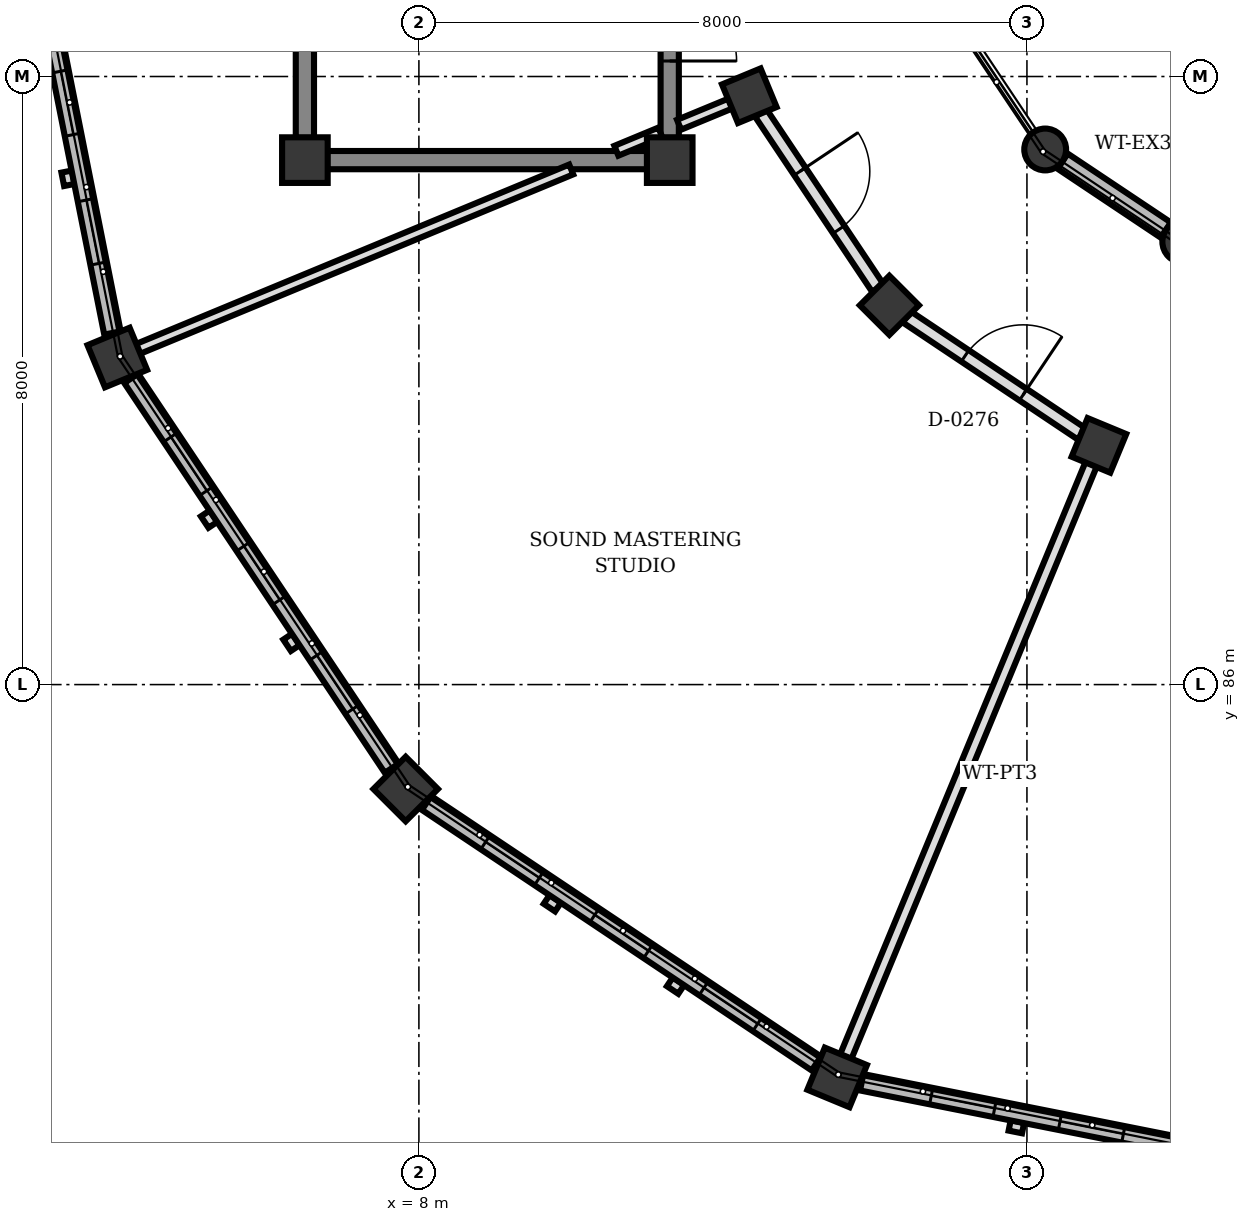
"""IFC4 building model, lengths in metres.
Left out: names, types, materials, properties, quantities, classifications, styles, units other than length and angle.
Written with IfcOpenShell. Run it as: python <this file> out.ifc"""

import sys

from ifc_helpers import new_model, si_unit, direction, frame, frame_2d, origin, origin_2d, place, context, subcontext, project, spatial, rectangle, circle, extrude, element, fill, save


model = new_model("IFC4")
c1 = context("Model", 3, precision=1e-05, world=origin(), true_north=direction((0.0, 1.0)))
c2 = subcontext(c1, "Body", "Model", "MODEL_VIEW")
j1 = project(units=[si_unit("LENGTHUNIT", "METRE"), si_unit("PLANEANGLEUNIT", "RADIAN")], contexts=[c1])
p1 = place(None, origin())
s1 = spatial("IfcSite", under=j1, at=p1, CompositionType="ELEMENT")
p2 = place(p1, origin())
s2 = spatial("IfcBuilding", under=s1, at=p2, CompositionType="ELEMENT")
p3 = place(p2, frame((0.0, 0.0, 12.5)))
s3 = spatial("IfcBuildingStorey", under=s2, at=p3, CompositionType="ELEMENT", Elevation=12.5)
for number, where, z_axis, x_axis in (
    (1, (6.5, 92.9, 0.0), (0.0, 0.0, 1.0), (1.0, 0.0, 0.0)),
    (2, (11.3, 92.9, 0.0), (0.0, 0.0, 1.0), (1.0, 0.0, 0.0)),
):
    element("IfcColumn", number, at=place(p3, frame(where, z_axis=z_axis, x_axis=x_axis)), inside=s3, PredefinedType="COLUMN", context=c2, shape_type="SweptSolid", body=[
        extrude(rectangle(XDim=0.6, YDim=0.6, at=origin_2d()), origin(), (0.0, 0.0, 1.0), 4.0),
    ])
for number, where, z_axis, x_axis in (
    (3, (16.24, 93.04, 0.0), (0.0, 0.0, 1.0), (1.0, 0.0, 0.0)),
    (4, (18.057, 91.826, 0.0), (0.0, 0.0, 1.0), (1.0, 0.0, 0.0)),
):
    element("IfcColumn", number, at=place(p3, frame(where, z_axis=z_axis, x_axis=x_axis)), inside=s3, PredefinedType="COLUMN", context=c2, shape_type="SweptSolid", body=[
        extrude(circle(Radius=0.275, at=origin_2d()), origin(), (0.0, 0.0, 1.0), 3.765),
    ])
for number, where, z_axis, x_axis in (
    (5, (12.347, 93.747, 0.0), (0.0, 0.0, 1.0), (-0.924, -0.383, 0.0)),
    (6, (14.19, 90.99, 0.0), (0.0, 0.0, 1.0), (-0.707, -0.707, 0.0)),
    (7, (16.947, 89.147, 0.0), (0.0, 0.0, 1.0), (-0.383, -0.924, 0.0)),
):
    element("IfcColumn", number, at=place(p3, frame(where, z_axis=z_axis, x_axis=x_axis)), inside=s3, PredefinedType="COLUMN", context=c2, shape_type="SweptSolid", body=[
        extrude(rectangle(XDim=0.55, YDim=0.55, at=origin_2d()), origin(), (0.0, 0.0, 1.0), 4.49),
    ])
for number, where, z_axis, x_axis in (
    (8, (4.032, 90.303, 0.0), (0.0, 0.0, 1.0), (-0.924, -0.383, 0.0)),
    (9, (7.826, 84.626, 0.0), (0.0, 0.0, 1.0), (-0.707, -0.707, 0.0)),
    (10, (13.503, 80.832, 0.0), (0.0, 0.0, 1.0), (-0.383, -0.924, 0.0)),
):
    element("IfcColumn", number, at=place(p3, frame(where, z_axis=z_axis, x_axis=x_axis)), inside=s3, PredefinedType="COLUMN", context=c2, shape_type="SweptSolid", body=[
        extrude(rectangle(XDim=0.6, YDim=0.6, at=origin_2d()), origin(), (0.0, 0.0, 1.0), 6.74),
    ])
p4 = place(p3, frame((3.968, 90.626, 0.0), z_axis=(0.0, 0.0, 1.0), x_axis=(-0.195164813773, 0.980770460131, 0.0)))
e11 = element("IfcWall", 11, at=p4, inside=s3, PredefinedType="SOLIDWALL", context=c2, shape_type="SweptSolid", body=[
    extrude(rectangle(XDim=6.17, YDim=0.22, at=frame_2d((3.085, 0.0))), origin(), (0.0, 0.0, 1.0), 6.25),
])
p5 = place(p4, frame((0.932, 0.0, 0.85)))
e12 = element("IfcOpeningElement", 12, at=p5, cuts=e11, PredefinedType="OPENING", context=c2, shape_type="SweptSolid", body=[
    extrude(rectangle(XDim=0.85, YDim=1.25, at=frame_2d((0.425, 0.625))), frame((0.0, 0.12, 0.0), z_axis=(0.0, -1.0, 0.0), x_axis=(1.0, 0.0, 0.0)), (0.0, 0.0, 1.0), 0.24),
])
p6 = place(p4, frame((2.66, 0.0, 0.85)))
e13 = element("IfcOpeningElement", 13, at=p6, cuts=e11, PredefinedType="OPENING", context=c2, shape_type="SweptSolid", body=[
    extrude(rectangle(XDim=0.85, YDim=1.25, at=frame_2d((0.425, 0.625))), frame((0.0, 0.12, 0.0), z_axis=(0.0, -1.0, 0.0), x_axis=(1.0, 0.0, 0.0)), (0.0, 0.0, 1.0), 0.24),
])
p7 = place(p4, frame((4.387, 0.0, 0.85)))
e14 = element("IfcOpeningElement", 14, at=p7, cuts=e11, PredefinedType="OPENING", context=c2, shape_type="SweptSolid", body=[
    extrude(rectangle(XDim=0.85, YDim=1.25, at=frame_2d((0.425, 0.625))), frame((0.0, 0.12, 0.0), z_axis=(0.0, -1.0, 0.0), x_axis=(1.0, 0.0, 0.0)), (0.0, 0.0, 1.0), 0.24),
])
p8 = place(p3, frame((7.643, 84.9, 0.0), z_axis=(0.0, 0.0, 1.0), x_axis=(-0.555658736667, 0.831410469242, 0.0)))
e15 = element("IfcWall", 15, at=p8, inside=s3, PredefinedType="SOLIDWALL", context=c2, shape_type="SweptSolid", body=[
    extrude(rectangle(XDim=6.169, YDim=0.22, at=frame_2d((3.084, 0.0))), origin(), (0.0, 0.0, 1.0), 6.25),
])
p9 = place(p8, frame((0.932, 0.0, 0.85)))
e16 = element("IfcOpeningElement", 16, at=p9, cuts=e15, PredefinedType="OPENING", context=c2, shape_type="SweptSolid", body=[
    extrude(rectangle(XDim=0.85, YDim=1.25, at=frame_2d((0.425, 0.625))), frame((0.0, 0.12, 0.0), z_axis=(0.0, -1.0, 0.0), x_axis=(1.0, 0.0, 0.0)), (0.0, 0.0, 1.0), 0.24),
])
p10 = place(p8, frame((2.66, 0.0, 0.85)))
e17 = element("IfcOpeningElement", 17, at=p10, cuts=e15, PredefinedType="OPENING", context=c2, shape_type="SweptSolid", body=[
    extrude(rectangle(XDim=0.85, YDim=1.25, at=frame_2d((0.425, 0.625))), frame((0.0, 0.12, 0.0), z_axis=(0.0, -1.0, 0.0), x_axis=(1.0, 0.0, 0.0)), (0.0, 0.0, 1.0), 0.24),
])
p11 = place(p8, frame((4.387, 0.0, 0.85)))
e18 = element("IfcOpeningElement", 18, at=p11, cuts=e15, PredefinedType="OPENING", context=c2, shape_type="SweptSolid", body=[
    extrude(rectangle(XDim=0.85, YDim=1.25, at=frame_2d((0.425, 0.625))), frame((0.0, 0.12, 0.0), z_axis=(0.0, -1.0, 0.0), x_axis=(1.0, 0.0, 0.0)), (0.0, 0.0, 1.0), 0.24),
])
p12 = place(p3, frame((13.229, 81.015, 0.0), z_axis=(0.0, 0.0, 1.0), x_axis=(-0.831379966495, 0.555704374025, 0.0)))
e19 = element("IfcWall", 19, at=p12, inside=s3, PredefinedType="SOLIDWALL", context=c2, shape_type="SweptSolid", body=[
    extrude(rectangle(XDim=6.169, YDim=0.22, at=frame_2d((3.084, 0.0))), origin(), (0.0, 0.0, 1.0), 6.25),
])
p13 = place(p12, frame((0.932, 0.0, 0.85)))
e20 = element("IfcOpeningElement", 20, at=p13, cuts=e19, PredefinedType="OPENING", context=c2, shape_type="SweptSolid", body=[
    extrude(rectangle(XDim=0.85, YDim=1.25, at=frame_2d((0.425, 0.625))), frame((0.0, 0.12, 0.0), z_axis=(0.0, -1.0, 0.0), x_axis=(1.0, 0.0, 0.0)), (0.0, 0.0, 1.0), 0.24),
])
p14 = place(p12, frame((2.66, 0.0, 0.85)))
e21 = element("IfcOpeningElement", 21, at=p14, cuts=e19, PredefinedType="OPENING", context=c2, shape_type="SweptSolid", body=[
    extrude(rectangle(XDim=0.85, YDim=1.25, at=frame_2d((0.425, 0.625))), frame((0.0, 0.12, 0.0), z_axis=(0.0, -1.0, 0.0), x_axis=(1.0, 0.0, 0.0)), (0.0, 0.0, 1.0), 0.24),
])
p15 = place(p12, frame((4.387, 0.0, 0.85)))
e22 = element("IfcOpeningElement", 22, at=p15, cuts=e19, PredefinedType="OPENING", context=c2, shape_type="SweptSolid", body=[
    extrude(rectangle(XDim=0.85, YDim=1.25, at=frame_2d((0.425, 0.625))), frame((0.0, 0.12, 0.0), z_axis=(0.0, -1.0, 0.0), x_axis=(1.0, 0.0, 0.0)), (0.0, 0.0, 1.0), 0.24),
])
p16 = place(p3, frame((16.47, 92.886, 0.0), z_axis=(0.0, 0.0, 1.0), x_axis=(0.83165874011, -0.555287078904, 0.0)))
e23 = element("IfcWall", 23, at=p16, inside=s3, PredefinedType="SOLIDWALL", context=c2, shape_type="SweptSolid", body=[
    extrude(rectangle(XDim=1.632, YDim=0.24, at=frame_2d((0.816, 0.0))), origin(), (0.0, 0.0, 1.0), 3.275),
])
p17 = place(p3, frame((19.877, 79.564, 0.0), z_axis=(0.0, 0.0, 1.0), x_axis=(-0.980770460131, 0.195164813773, 0.0)))
e24 = element("IfcWall", 24, at=p17, inside=s3, PredefinedType="SOLIDWALL", context=c2, shape_type="SweptSolid", body=[
    extrude(rectangle(XDim=6.17, YDim=0.22, at=frame_2d((3.085, 0.0))), origin(), (0.0, 0.0, 1.0), 6.25),
])
p18 = place(p17, frame((0.932, 0.0, 0.85)))
e25 = element("IfcOpeningElement", 25, at=p18, cuts=e24, PredefinedType="OPENING", context=c2, shape_type="SweptSolid", body=[
    extrude(rectangle(XDim=0.85, YDim=1.25, at=frame_2d((0.425, 0.625))), frame((0.0, 0.12, 0.0), z_axis=(0.0, -1.0, 0.0), x_axis=(1.0, 0.0, 0.0)), (0.0, 0.0, 1.0), 0.24),
])
p19 = place(p17, frame((2.66, 0.0, 0.85)))
e26 = element("IfcOpeningElement", 26, at=p19, cuts=e24, PredefinedType="OPENING", context=c2, shape_type="SweptSolid", body=[
    extrude(rectangle(XDim=0.85, YDim=1.25, at=frame_2d((0.425, 0.625))), frame((0.0, 0.12, 0.0), z_axis=(0.0, -1.0, 0.0), x_axis=(1.0, 0.0, 0.0)), (0.0, 0.0, 1.0), 0.24),
])
p20 = place(p17, frame((4.387, 0.0, 0.85)))
e27 = element("IfcOpeningElement", 27, at=p20, cuts=e24, PredefinedType="OPENING", context=c2, shape_type="SweptSolid", body=[
    extrude(rectangle(XDim=0.85, YDim=1.25, at=frame_2d((0.425, 0.625))), frame((0.0, 0.12, 0.0), z_axis=(0.0, -1.0, 0.0), x_axis=(1.0, 0.0, 0.0)), (0.0, 0.0, 1.0), 0.24),
])
p21 = place(p3, frame((6.5, 93.192, 0.0), z_axis=(0.0, 0.0, 1.0), x_axis=(0.0, 1.0, 0.0)))
e28 = element("IfcWall", 28, at=p21, inside=s3, PredefinedType="SHEAR", context=c2, shape_type="SweptSolid", body=[
    extrude(rectangle(XDim=8.136, YDim=0.24, at=frame_2d((4.068, 0.0))), origin(), (0.0, 0.0, 1.0), 3.74),
])
p22 = place(p3, frame((11.3, 101.328, 0.0), z_axis=(0.0, 0.0, 1.0), x_axis=(0.0, -1.0, 0.0)))
e29 = element("IfcWall", 29, at=p22, inside=s3, PredefinedType="SHEAR", context=c2, shape_type="SweptSolid", body=[
    extrude(rectangle(XDim=8.136, YDim=0.24, at=frame_2d((4.068, 0.0))), origin(), (0.0, 0.0, 1.0), 3.74),
])
p23 = place(p22, frame((6.244, 0.0, 0.0)))
e30 = element("IfcOpeningElement", 30, at=p23, cuts=e29, PredefinedType="OPENING", context=c2, shape_type="SweptSolid", body=[
    extrude(rectangle(XDim=0.88, YDim=2.1, at=frame_2d((0.44, 1.05))), frame((0.0, 0.13, 0.0), z_axis=(0.0, -1.0, 0.0), x_axis=(1.0, 0.0, 0.0)), (0.0, 0.0, 1.0), 0.26),
])
p24 = place(p3, frame((11.008, 92.9, 0.0), z_axis=(0.0, 0.0, 1.0), x_axis=(-1.0, 0.0, 0.0)))
e31 = element("IfcWall", 31, at=p24, inside=s3, PredefinedType="SHEAR", context=c2, shape_type="SweptSolid", body=[
    extrude(rectangle(XDim=4.216, YDim=0.24, at=frame_2d((2.108, 0.0))), origin(), (0.0, 0.0, 1.0), 3.74),
])
p25 = place(p3, frame((12.1, 93.645, 0.0), z_axis=(0.0, 0.0, 1.0), x_axis=(-0.924069600435, -0.382224245113, 0.0)))
e32 = element("IfcWall", 32, at=p25, inside=s3, PredefinedType="PARTITIONING", context=c2, shape_type="SweptSolid", body=[
    extrude(rectangle(XDim=0.733, YDim=0.14, at=frame_2d((0.366, 0.0))), origin(), (0.0, 0.0, 1.0), 3.7),
])
p26 = place(p3, frame((11.177, 93.263, 0.0), z_axis=(0.0, 0.0, 1.0), x_axis=(-0.923812676193, -0.382844797933, 0.0)))
e33 = element("IfcWall", 33, at=p26, inside=s3, PredefinedType="PARTITIONING", context=c2, shape_type="SweptSolid", body=[
    extrude(rectangle(XDim=0.627, YDim=0.14, at=frame_2d((0.313, 0.0))), origin(), (0.0, 0.0, 1.0), 3.7),
])
p27 = place(p3, frame((10.004, 92.777, 0.0), z_axis=(0.0, 0.0, 1.0), x_axis=(-0.923864955254, -0.382718623082, 0.0)))
e34 = element("IfcWall", 34, at=p27, inside=s3, PredefinedType="PARTITIONING", context=c2, shape_type="SweptSolid", body=[
    extrude(rectangle(XDim=6.172, YDim=0.14, at=frame_2d((3.086, 0.0))), origin(), (0.0, 0.0, 1.0), 3.7),
])
p28 = place(p3, frame((16.845, 88.9, 0.0), z_axis=(0.0, 0.0, 1.0), x_axis=(-0.382683896966, -0.923879340067, 0.0)))
e35 = element("IfcWall", 35, at=p28, inside=s3, PredefinedType="PARTITIONING", context=c2, shape_type="SweptSolid", body=[
    extrude(rectangle(XDim=8.44, YDim=0.16, at=frame_2d((4.22, 0.0))), origin(), (0.0, 0.0, 1.0), 3.7),
])
p29 = place(p3, frame((12.498, 93.521, 0.0), z_axis=(0.0, 0.0, 1.0), x_axis=(0.555797002478, -0.831318045056, 0.0)))
e36 = element("IfcWall", 36, at=p29, inside=s3, PredefinedType="PARTITIONING", context=c2, shape_type="SweptSolid", body=[
    extrude(rectangle(XDim=2.773, YDim=0.18, at=frame_2d((1.386, 0.0))), origin(), (0.0, 0.0, 1.0), 3.7),
])
p30 = place(p29, frame((0.926, 0.0, 0.0)))
e37 = element("IfcOpeningElement", 37, at=p30, cuts=e36, PredefinedType="OPENING", context=c2, shape_type="SweptSolid", body=[
    extrude(rectangle(XDim=0.92, YDim=2.1, at=frame_2d((0.46, 1.05))), frame((0.0, 0.1, 0.0), z_axis=(0.0, -1.0, 0.0), x_axis=(1.0, 0.0, 0.0)), (0.0, 0.0, 1.0), 0.2),
])
p31 = place(p3, frame((14.416, 90.839, 0.0), z_axis=(0.0, 0.0, 1.0), x_axis=(0.831318045056, -0.555797002478, 0.0)))
e38 = element("IfcWall", 38, at=p31, inside=s3, PredefinedType="PARTITIONING", context=c2, shape_type="SweptSolid", body=[
    extrude(rectangle(XDim=2.773, YDim=0.18, at=frame_2d((1.386, 0.0))), origin(), (0.0, 0.0, 1.0), 3.7),
])
p32 = place(p31, frame((0.926, 0.0, 0.0)))
e39 = element("IfcOpeningElement", 39, at=p32, cuts=e38, PredefinedType="OPENING", context=c2, shape_type="SweptSolid", body=[
    extrude(rectangle(XDim=0.92, YDim=2.1, at=frame_2d((0.46, 1.05))), frame((0.0, 0.1, 0.0), z_axis=(0.0, -1.0, 0.0), x_axis=(1.0, 0.0, 0.0)), (0.0, 0.0, 1.0), 0.2),
])
p33 = place(p5, origin())
e40 = element("IfcWindow", 40, at=p33, inside=s3, PartitioningType="SINGLE_PANEL", PredefinedType="WINDOW", context=c2, shape_type="SweptSolid", body=[
    extrude(rectangle(XDim=0.85, YDim=1.25, at=frame_2d((0.425, 0.625))), frame((0.0, 0.03, 0.0), z_axis=(0.0, -1.0, 0.0), x_axis=(1.0, 0.0, 0.0)), (0.0, 0.0, 1.0), 0.06),
])
fill(e12, e40)
p34 = place(p6, origin())
e41 = element("IfcWindow", 41, at=p34, inside=s3, PartitioningType="SINGLE_PANEL", PredefinedType="WINDOW", context=c2, shape_type="SweptSolid", body=[
    extrude(rectangle(XDim=0.85, YDim=1.25, at=frame_2d((0.425, 0.625))), frame((0.0, 0.03, 0.0), z_axis=(0.0, -1.0, 0.0), x_axis=(1.0, 0.0, 0.0)), (0.0, 0.0, 1.0), 0.06),
])
fill(e13, e41)
p35 = place(p9, origin())
e42 = element("IfcWindow", 42, at=p35, inside=s3, PartitioningType="SINGLE_PANEL", PredefinedType="WINDOW", context=c2, shape_type="SweptSolid", body=[
    extrude(rectangle(XDim=0.85, YDim=1.25, at=frame_2d((0.425, 0.625))), frame((0.0, 0.03, 0.0), z_axis=(0.0, -1.0, 0.0), x_axis=(1.0, 0.0, 0.0)), (0.0, 0.0, 1.0), 0.06),
])
fill(e16, e42)
p36 = place(p10, origin())
e43 = element("IfcWindow", 43, at=p36, inside=s3, PartitioningType="SINGLE_PANEL", PredefinedType="WINDOW", context=c2, shape_type="SweptSolid", body=[
    extrude(rectangle(XDim=0.85, YDim=1.25, at=frame_2d((0.425, 0.625))), frame((0.0, 0.03, 0.0), z_axis=(0.0, -1.0, 0.0), x_axis=(1.0, 0.0, 0.0)), (0.0, 0.0, 1.0), 0.06),
])
fill(e17, e43)
p37 = place(p11, origin())
e44 = element("IfcWindow", 44, at=p37, inside=s3, PartitioningType="SINGLE_PANEL", PredefinedType="WINDOW", context=c2, shape_type="SweptSolid", body=[
    extrude(rectangle(XDim=0.85, YDim=1.25, at=frame_2d((0.425, 0.625))), frame((0.0, 0.03, 0.0), z_axis=(0.0, -1.0, 0.0), x_axis=(1.0, 0.0, 0.0)), (0.0, 0.0, 1.0), 0.06),
])
fill(e18, e44)
p38 = place(p13, origin())
e45 = element("IfcWindow", 45, at=p38, inside=s3, PartitioningType="SINGLE_PANEL", PredefinedType="WINDOW", context=c2, shape_type="SweptSolid", body=[
    extrude(rectangle(XDim=0.85, YDim=1.25, at=frame_2d((0.425, 0.625))), frame((0.0, 0.03, 0.0), z_axis=(0.0, -1.0, 0.0), x_axis=(1.0, 0.0, 0.0)), (0.0, 0.0, 1.0), 0.06),
])
fill(e20, e45)
p39 = place(p14, origin())
e46 = element("IfcWindow", 46, at=p39, inside=s3, PartitioningType="SINGLE_PANEL", PredefinedType="WINDOW", context=c2, shape_type="SweptSolid", body=[
    extrude(rectangle(XDim=0.85, YDim=1.25, at=frame_2d((0.425, 0.625))), frame((0.0, 0.03, 0.0), z_axis=(0.0, -1.0, 0.0), x_axis=(1.0, 0.0, 0.0)), (0.0, 0.0, 1.0), 0.06),
])
fill(e21, e46)
p40 = place(p15, origin())
e47 = element("IfcWindow", 47, at=p40, inside=s3, PartitioningType="SINGLE_PANEL", PredefinedType="WINDOW", context=c2, shape_type="SweptSolid", body=[
    extrude(rectangle(XDim=0.85, YDim=1.25, at=frame_2d((0.425, 0.625))), frame((0.0, 0.03, 0.0), z_axis=(0.0, -1.0, 0.0), x_axis=(1.0, 0.0, 0.0)), (0.0, 0.0, 1.0), 0.06),
])
fill(e22, e47)
p41 = place(p19, origin())
e48 = element("IfcWindow", 48, at=p41, inside=s3, PartitioningType="SINGLE_PANEL", PredefinedType="WINDOW", context=c2, shape_type="SweptSolid", body=[
    extrude(rectangle(XDim=0.85, YDim=1.25, at=frame_2d((0.425, 0.625))), frame((0.0, 0.03, 0.0), z_axis=(0.0, -1.0, 0.0), x_axis=(1.0, 0.0, 0.0)), (0.0, 0.0, 1.0), 0.06),
])
fill(e26, e48)
p42 = place(p20, origin())
e49 = element("IfcWindow", 49, at=p42, inside=s3, PartitioningType="SINGLE_PANEL", PredefinedType="WINDOW", context=c2, shape_type="SweptSolid", body=[
    extrude(rectangle(XDim=0.85, YDim=1.25, at=frame_2d((0.425, 0.625))), frame((0.0, 0.03, 0.0), z_axis=(0.0, -1.0, 0.0), x_axis=(1.0, 0.0, 0.0)), (0.0, 0.0, 1.0), 0.06),
])
fill(e27, e49)
p43 = place(p23, origin())
e50 = element("IfcDoor", 50, at=p43, inside=s3, OperationType="SINGLE_SWING_RIGHT", PredefinedType="DOOR", context=c2, shape_type="SweptSolid", body=[
    extrude(rectangle(XDim=0.88, YDim=2.1, at=frame_2d((0.44, 1.05))), frame((0.0, 0.025, 0.0), z_axis=(0.0, -1.0, 0.0), x_axis=(1.0, 0.0, 0.0)), (0.0, 0.0, 1.0), 0.05),
])
fill(e30, e50)
p44 = place(p30, origin())
e51 = element("IfcDoor", 51, at=p44, inside=s3, OperationType="SINGLE_SWING_LEFT", PredefinedType="DOOR", context=c2, shape_type="SweptSolid", body=[
    extrude(rectangle(XDim=0.92, YDim=2.1, at=frame_2d((0.46, 1.05))), frame((0.0, 0.025, 0.0), z_axis=(0.0, -1.0, 0.0), x_axis=(1.0, 0.0, 0.0)), (0.0, 0.0, 1.0), 0.05),
])
fill(e37, e51)
p45 = place(p32, origin())
e52 = element("IfcDoor", 52, at=p45, inside=s3, OperationType="SINGLE_SWING_RIGHT", PredefinedType="DOOR", context=c2, shape_type="SweptSolid", body=[
    extrude(rectangle(XDim=0.92, YDim=2.1, at=frame_2d((0.46, 1.05))), frame((0.0, 0.025, 0.0), z_axis=(0.0, -1.0, 0.0), x_axis=(1.0, 0.0, 0.0)), (0.0, 0.0, 1.0), 0.05),
])
fill(e39, e52)
save(model, sys.argv[1])
